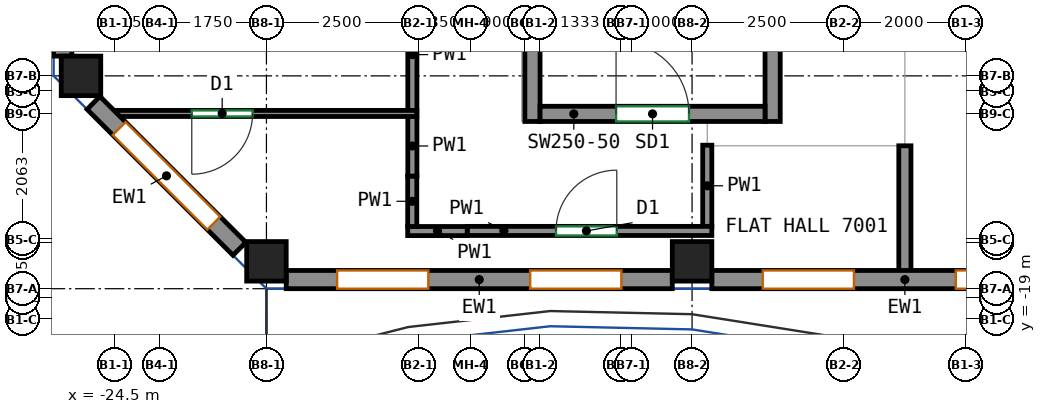
"""IFC4 building model, lengths in metres.
Left out: names, types, materials, properties, quantities, classifications, styles, units other than length and angle.
Written with IfcOpenShell. Run it as: python <this file> out.ifc"""

import sys

from ifc_helpers import new_model, si_unit, direction, frame, frame_2d, origin, origin_2d, place, context, subcontext, project, spatial, rectangle, extrude, source, transform, mapped, element, fill, save


model = new_model("IFC4")
c1 = context("Model", 3, precision=1e-05, world=origin(), true_north=direction((0.0, 1.0)))
c2 = subcontext(c1, "Body", "Model", "MODEL_VIEW")
j1 = project(units=[si_unit("LENGTHUNIT", "METRE"), si_unit("PLANEANGLEUNIT", "RADIAN")], contexts=[c1])
p1 = place(None, origin())
s1 = spatial("IfcSite", under=j1, at=p1, CompositionType="ELEMENT")
p2 = place(p1, origin())
s2 = spatial("IfcBuilding", under=s1, at=p2, CompositionType="ELEMENT")
p3 = place(p2, frame((0.0, 0.0, 284.0)))
s3 = spatial("IfcBuildingStorey", under=s2, at=p3, CompositionType="ELEMENT", Elevation=284.0)
m1 = source(origin(), c2, "Body", "SweptSolid", [
    extrude(rectangle(XDim=0.65, YDim=0.65, at=origin_2d()), origin(), (0.0, 0.0, 1.0), 3.12),
])
for number, where, z_axis, x_axis in (
    (1, (-25.05, -15.0, 0.0), (0.0, 0.0, 1.0), (1.0, 0.0, 0.0)),
    (2, (-22.0, -18.05, 0.0), (0.0, 0.0, 1.0), (1.0, 0.0, 0.0)),
    (3, (-15.0, -18.05, 0.0), (0.0, 0.0, 1.0), (1.0, 0.0, 0.0)),
):
    element("IfcColumn", number, at=place(p3, frame(where, z_axis=z_axis, x_axis=x_axis)), inside=s3, PredefinedType="COLUMN", context=c2, shape_type="MappedRepresentation", body=[
        mapped(m1, transform((0.0, 0.0, 0.0))),
    ])
m2 = source(origin(), c2, "Body", "SweptSolid", [
    extrude(rectangle(XDim=8.0, YDim=0.25, at=frame_2d((4.0, 0.0))), origin(), (0.0, 0.0, 1.0), 3.12),
])
for number, where, z_axis, x_axis in (
    (4, (-17.625, -15.75, 0.0), (0.0, 0.0, 1.0), (0.0, 1.0, 0.0)),
    (5, (-13.675, -15.75, 0.0), (0.0, 0.0, 1.0), (0.0, 1.0, 0.0)),
):
    element("IfcWall", number, at=place(p3, frame(where, z_axis=z_axis, x_axis=x_axis)), inside=s3, PredefinedType="SHEAR", context=c2, shape_type="MappedRepresentation", body=[
        mapped(m2, transform((0.0, 0.0, 0.0))),
    ])
m3 = source(origin(), c2, "Body", "SweptSolid", [
    extrude(rectangle(XDim=3.7, YDim=0.25, at=frame_2d((1.85, 0.0))), origin(), (0.0, 0.0, 1.0), 3.12),
])
p4 = place(p3, frame((-17.5, -15.625, 0.0), z_axis=(0.0, 0.0, 1.0), x_axis=(1.0, 0.0, 0.0)))
e6 = element("IfcWall", 6, at=p4, inside=s3, PredefinedType="SHEAR", context=c2, shape_type="MappedRepresentation", body=[
    mapped(m3, transform((0.0, 0.0, 0.0))),
])
p5 = place(p4, frame((1.25, 0.0, 0.0)))
e7 = element("IfcOpeningElement", 7, at=p5, cuts=e6, PredefinedType="OPENING", context=c2, shape_type="SweptSolid", body=[
    extrude(rectangle(XDim=1.2, YDim=2.1, at=frame_2d((0.6, 1.05))), frame((0.0, 0.135, 0.0), z_axis=(0.0, -1.0, 0.0), x_axis=(1.0, 0.0, 0.0)), (0.0, 0.0, 1.0), 0.27),
])
m4 = source(origin(), c2, "Body", "SweptSolid", [
    extrude(rectangle(XDim=6.35, YDim=0.3, at=frame_2d((3.175, 0.0))), origin(), (0.0, 0.0, 1.0), 3.12),
])
p6 = place(p3, frame((-21.675, -18.35, 0.0), z_axis=(0.0, 0.0, 1.0), x_axis=(1.0, 0.0, 0.0)))
e8 = element("IfcWall", 8, at=p6, inside=s3, PredefinedType="SOLIDWALL", context=c2, shape_type="MappedRepresentation", body=[
    mapped(m4, transform((0.0, 0.0, 0.0))),
])
p7 = place(p6, frame((0.837, 0.0, 0.8)))
e9 = element("IfcOpeningElement", 9, at=p7, cuts=e8, PredefinedType="OPENING", context=c2, shape_type="SweptSolid", body=[
    extrude(rectangle(XDim=1.5, YDim=2.05, at=frame_2d((0.75, 1.025))), frame((0.0, 0.16, 0.0), z_axis=(0.0, -1.0, 0.0), x_axis=(1.0, 0.0, 0.0)), (0.0, 0.0, 1.0), 0.32),
])
p8 = place(p6, frame((4.012, 0.0, 0.8)))
e10 = element("IfcOpeningElement", 10, at=p8, cuts=e8, PredefinedType="OPENING", context=c2, shape_type="SweptSolid", body=[
    extrude(rectangle(XDim=1.5, YDim=2.05, at=frame_2d((0.75, 1.025))), frame((0.0, 0.16, 0.0), z_axis=(0.0, -1.0, 0.0), x_axis=(1.0, 0.0, 0.0)), (0.0, 0.0, 1.0), 0.32),
])
p9 = place(p3, frame((-14.675, -18.35, 0.0), z_axis=(0.0, 0.0, 1.0), x_axis=(1.0, 0.0, 0.0)))
e11 = element("IfcWall", 11, at=p9, inside=s3, PredefinedType="SOLIDWALL", context=c2, shape_type="MappedRepresentation", body=[
    mapped(m4, transform((0.0, 0.0, 0.0))),
])
p10 = place(p9, frame((0.837, 0.0, 0.8)))
e12 = element("IfcOpeningElement", 12, at=p10, cuts=e11, PredefinedType="OPENING", context=c2, shape_type="SweptSolid", body=[
    extrude(rectangle(XDim=1.5, YDim=2.05, at=frame_2d((0.75, 1.025))), frame((0.0, 0.16, 0.0), z_axis=(0.0, -1.0, 0.0), x_axis=(1.0, 0.0, 0.0)), (0.0, 0.0, 1.0), 0.32),
])
p11 = place(p9, frame((4.012, 0.0, 0.8)))
e13 = element("IfcOpeningElement", 13, at=p11, cuts=e11, PredefinedType="OPENING", context=c2, shape_type="SweptSolid", body=[
    extrude(rectangle(XDim=1.5, YDim=2.05, at=frame_2d((0.75, 1.025))), frame((0.0, 0.16, 0.0), z_axis=(0.0, -1.0, 0.0), x_axis=(1.0, 0.0, 0.0)), (0.0, 0.0, 1.0), 0.32),
])
m5 = source(origin(), c2, "Body", "SweptSolid", [
    extrude(rectangle(XDim=4.683, YDim=0.3, at=frame_2d((2.342, 0.0))), origin(), (0.0, 0.0, 1.0), 3.12),
])
p12 = place(p3, frame((-25.35, -9.992, 0.0), z_axis=(0.0, 0.0, 1.0), x_axis=(0.0, -1.0, 0.0)))
e14 = element("IfcWall", 14, at=p12, inside=s3, PredefinedType="SOLIDWALL", context=c2, shape_type="MappedRepresentation", body=[
    mapped(m5, transform((0.0, 0.0, 0.0))),
])
p13 = place(p12, frame((1.242, 0.0, 0.8)))
e15 = element("IfcOpeningElement", 15, at=p13, cuts=e14, PredefinedType="OPENING", context=c2, shape_type="SweptSolid", body=[
    extrude(rectangle(XDim=2.2, YDim=2.05, at=frame_2d((1.1, 1.025))), frame((0.0, 0.16, 0.0), z_axis=(0.0, -1.0, 0.0), x_axis=(1.0, 0.0, 0.0)), (0.0, 0.0, 1.0), 0.32),
])
m6 = source(origin(), c2, "Body", "SweptSolid", [
    extrude(rectangle(XDim=3.394, YDim=0.3, at=frame_2d((1.697, 0.0))), origin(), (0.0, 0.0, 1.0), 3.12),
])
p14 = place(p3, frame((-24.844, -15.444, 0.0), z_axis=(0.0, 0.0, 1.0), x_axis=(0.707070815327, -0.707142745217, 0.0)))
e16 = element("IfcWall", 16, at=p14, inside=s3, PredefinedType="SOLIDWALL", context=c2, shape_type="MappedRepresentation", body=[
    mapped(m6, transform((0.0, 0.0, 0.0))),
])
p15 = place(p14, frame((0.597, 0.0, 0.8)))
e17 = element("IfcOpeningElement", 17, at=p15, cuts=e16, PredefinedType="OPENING", context=c2, shape_type="SweptSolid", body=[
    extrude(rectangle(XDim=2.2, YDim=2.05, at=frame_2d((1.1, 1.025))), frame((0.0, 0.16, 0.0), z_axis=(0.0, -1.0, 0.0), x_axis=(1.0, 0.0, 0.0)), (0.0, 0.0, 1.0), 0.32),
])
p16 = place(p3, frame((-14.75, -17.475, 0.0), z_axis=(0.0, 0.0, 1.0), x_axis=(0.0, 1.0, 0.0)))
e18 = element("IfcWall", 18, at=p16, inside=s3, PredefinedType="PARTITIONING", context=c2, shape_type="SweptSolid", body=[
    extrude(rectangle(XDim=1.335, YDim=0.15, at=frame_2d((0.667, 0.0))), origin(), (0.0, 0.0, 1.0), 3.12),
])
p17 = place(p3, frame((-18.698, -17.55, 0.0), z_axis=(0.0, 0.0, 1.0), x_axis=(1.0, 0.0, 0.0)))
e19 = element("IfcWall", 19, at=p17, inside=s3, PredefinedType="PARTITIONING", context=c2, shape_type="SweptSolid", body=[
    extrude(rectangle(XDim=4.023, YDim=0.15, at=frame_2d((2.011, 0.0))), origin(), (0.0, 0.0, 1.0), 3.12),
])
p18 = place(p17, frame((1.46, 0.0, 0.0)))
e20 = element("IfcOpeningElement", 20, at=p18, cuts=e19, PredefinedType="OPENING", context=c2, shape_type="SweptSolid", body=[
    extrude(rectangle(XDim=1.0, YDim=2.1, at=frame_2d((0.5, 1.05))), frame((0.0, 0.085, 0.0), z_axis=(0.0, -1.0, 0.0), x_axis=(1.0, 0.0, 0.0)), (0.0, 0.0, 1.0), 0.17),
])
p19 = place(p3, frame((-19.677, -17.552, 0.0), z_axis=(0.0, 0.0, 1.0), x_axis=(1.0, 0.0, 0.0)))
e21 = element("IfcWall", 21, at=p19, inside=s3, PredefinedType="PARTITIONING", context=c2, shape_type="SweptSolid", body=[
    extrude(rectangle(XDim=0.979, YDim=0.15, at=frame_2d((0.49, 0.0))), origin(), (0.0, 0.0, 1.0), 3.12),
])
p20 = place(p3, frame((-19.602, -17.477, 0.0), z_axis=(0.0, 0.0, 1.0), x_axis=(0.0, 1.0, 0.0)))
e22 = element("IfcWall", 22, at=p20, inside=s3, PredefinedType="PARTITIONING", context=c2, shape_type="SweptSolid", body=[
    extrude(rectangle(XDim=0.829, YDim=0.15, at=frame_2d((0.415, 0.0))), origin(), (0.0, 0.0, 1.0), 3.12),
])
p21 = place(p3, frame((-19.6, -16.648, 0.0), z_axis=(0.0, 0.0, 1.0), x_axis=(0.0, 1.0, 0.0)))
e23 = element("IfcWall", 23, at=p21, inside=s3, PredefinedType="PARTITIONING", context=c2, shape_type="SweptSolid", body=[
    extrude(rectangle(XDim=0.99, YDim=0.15, at=frame_2d((0.495, 0.0))), origin(), (0.0, 0.0, 1.0), 3.12),
])
p22 = place(p3, frame((-19.6, -15.578, 0.0), z_axis=(0.0, 0.0, 1.0), x_axis=(0.0, 1.0, 0.0)))
e24 = element("IfcWall", 24, at=p22, inside=s3, PredefinedType="PARTITIONING", context=c2, shape_type="SweptSolid", body=[
    extrude(rectangle(XDim=1.855, YDim=0.15, at=frame_2d((0.927, 0.0))), origin(), (0.0, 0.0, 1.0), 3.12),
])
p23 = place(p3, frame((-19.527, -15.618, 0.0), z_axis=(0.0, 0.0, 1.0), x_axis=(-1.0, 0.0, 0.0)))
e25 = element("IfcWall", 25, at=p23, inside=s3, PredefinedType="PARTITIONING", context=c2, shape_type="SweptSolid", body=[
    extrude(rectangle(XDim=5.001, YDim=0.1, at=frame_2d((2.5, 0.0))), origin(), (0.0, 0.0, 1.0), 3.12),
])
p24 = place(p23, frame((2.701, 0.0, 0.0)))
e26 = element("IfcOpeningElement", 26, at=p24, cuts=e25, PredefinedType="OPENING", context=c2, shape_type="SweptSolid", body=[
    extrude(rectangle(XDim=1.0, YDim=2.1, at=frame_2d((0.5, 1.05))), frame((0.0, 0.06, 0.0), z_axis=(0.0, -1.0, 0.0), x_axis=(1.0, 0.0, 0.0)), (0.0, 0.0, 1.0), 0.12),
])
p25 = place(p3, frame((-11.5, -18.25, 0.0), z_axis=(0.0, 0.0, 1.0), x_axis=(0.0, 1.0, 0.0)))
e27 = element("IfcWall", 27, at=p25, inside=s3, PredefinedType="PARTITIONING", context=c2, shape_type="SweptSolid", body=[
    extrude(rectangle(XDim=2.1, YDim=0.2, at=frame_2d((1.05, 0.0))), origin(), (0.0, 0.0, 1.0), 3.12),
])
p26 = place(p7, origin())
e28 = element("IfcWindow", 28, at=p26, inside=s3, PartitioningType="SINGLE_PANEL", PredefinedType="WINDOW", context=c2, shape_type="SweptSolid", body=[
    extrude(rectangle(XDim=1.5, YDim=2.05, at=frame_2d((0.75, 1.025))), frame((0.0, 0.03, 0.0), z_axis=(0.0, -1.0, 0.0), x_axis=(1.0, 0.0, 0.0)), (0.0, 0.0, 1.0), 0.06),
])
fill(e9, e28)
p27 = place(p8, origin())
e29 = element("IfcWindow", 29, at=p27, inside=s3, PartitioningType="SINGLE_PANEL", PredefinedType="WINDOW", context=c2, shape_type="SweptSolid", body=[
    extrude(rectangle(XDim=1.5, YDim=2.05, at=frame_2d((0.75, 1.025))), frame((0.0, 0.03, 0.0), z_axis=(0.0, -1.0, 0.0), x_axis=(1.0, 0.0, 0.0)), (0.0, 0.0, 1.0), 0.06),
])
fill(e10, e29)
p28 = place(p10, origin())
e30 = element("IfcWindow", 30, at=p28, inside=s3, PartitioningType="SINGLE_PANEL", PredefinedType="WINDOW", context=c2, shape_type="SweptSolid", body=[
    extrude(rectangle(XDim=1.5, YDim=2.05, at=frame_2d((0.75, 1.025))), frame((0.0, 0.03, 0.0), z_axis=(0.0, -1.0, 0.0), x_axis=(1.0, 0.0, 0.0)), (0.0, 0.0, 1.0), 0.06),
])
fill(e12, e30)
p29 = place(p11, origin())
e31 = element("IfcWindow", 31, at=p29, inside=s3, PartitioningType="SINGLE_PANEL", PredefinedType="WINDOW", context=c2, shape_type="SweptSolid", body=[
    extrude(rectangle(XDim=1.5, YDim=2.05, at=frame_2d((0.75, 1.025))), frame((0.0, 0.03, 0.0), z_axis=(0.0, -1.0, 0.0), x_axis=(1.0, 0.0, 0.0)), (0.0, 0.0, 1.0), 0.06),
])
fill(e13, e31)
p30 = place(p15, origin())
e32 = element("IfcWindow", 32, at=p30, inside=s3, PartitioningType="SINGLE_PANEL", PredefinedType="WINDOW", context=c2, shape_type="SweptSolid", body=[
    extrude(rectangle(XDim=2.2, YDim=2.05, at=frame_2d((1.1, 1.025))), frame((0.0, 0.03, 0.0), z_axis=(0.0, -1.0, 0.0), x_axis=(1.0, 0.0, 0.0)), (0.0, 0.0, 1.0), 0.06),
])
fill(e17, e32)
p31 = place(p5, origin())
e33 = element("IfcDoor", 33, at=p31, inside=s3, OperationType="DOUBLE_DOOR_SINGLE_SWING", PredefinedType="DOOR", context=c2, shape_type="SweptSolid", body=[
    extrude(rectangle(XDim=1.2, YDim=2.1, at=frame_2d((0.6, 1.05))), frame((0.0, 0.025, 0.0), z_axis=(0.0, -1.0, 0.0), x_axis=(1.0, 0.0, 0.0)), (0.0, 0.0, 1.0), 0.05),
])
fill(e7, e33)
p32 = place(p18, origin())
e34 = element("IfcDoor", 34, at=p32, inside=s3, OperationType="SINGLE_SWING_RIGHT", PredefinedType="DOOR", context=c2, shape_type="SweptSolid", body=[
    extrude(rectangle(XDim=1.0, YDim=2.1, at=frame_2d((0.5, 1.05))), frame((0.0, 0.025, 0.0), z_axis=(0.0, -1.0, 0.0), x_axis=(1.0, 0.0, 0.0)), (0.0, 0.0, 1.0), 0.05),
])
fill(e20, e34)
p33 = place(p24, origin())
e35 = element("IfcDoor", 35, at=p33, inside=s3, OperationType="SINGLE_SWING_RIGHT", PredefinedType="DOOR", context=c2, shape_type="SweptSolid", body=[
    extrude(rectangle(XDim=1.0, YDim=2.1, at=frame_2d((0.5, 1.05))), frame((0.0, 0.025, 0.0), z_axis=(0.0, -1.0, 0.0), x_axis=(1.0, 0.0, 0.0)), (0.0, 0.0, 1.0), 0.05),
])
fill(e26, e35)
save(model, sys.argv[1])
